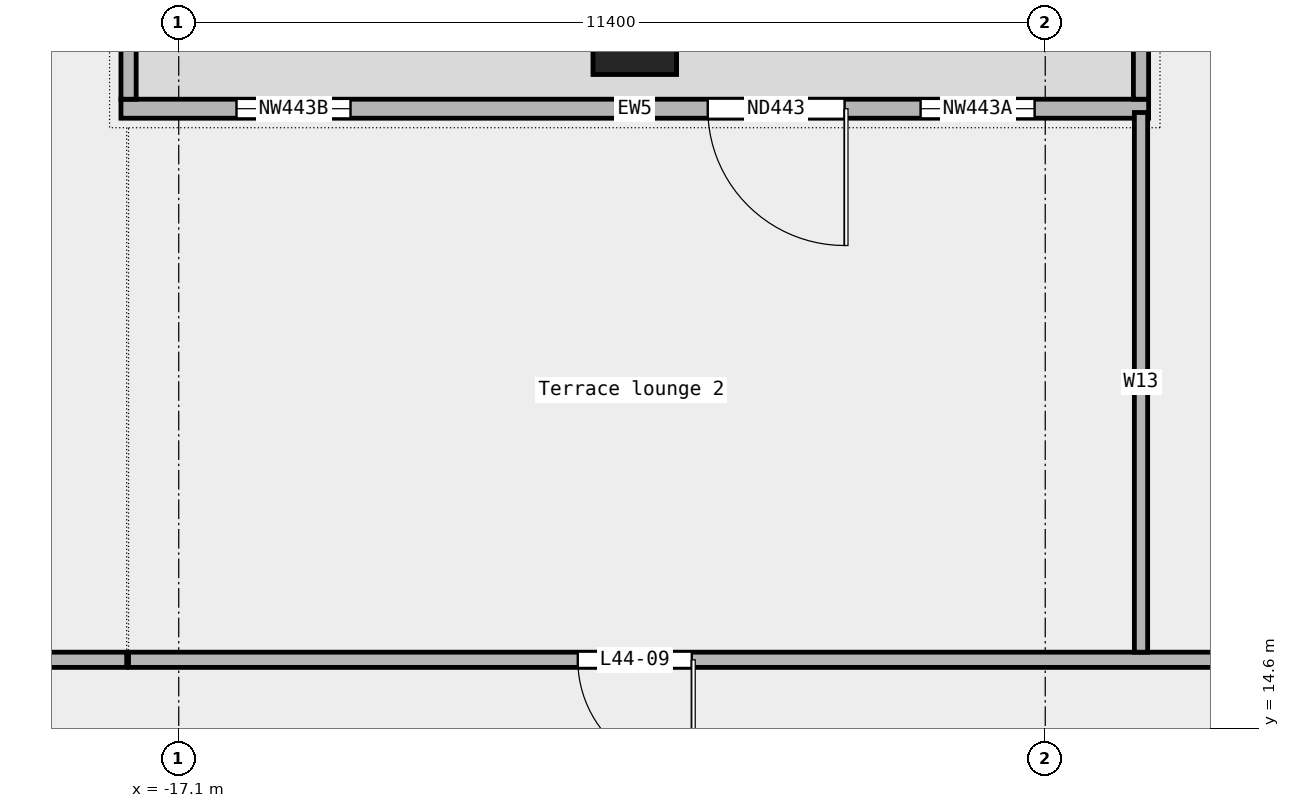
"""IFC4 building model, lengths in metres.
Left out: names, types, materials, properties, quantities, classifications, styles, units other than length and angle.
Written with IfcOpenShell. Run it as: python <this file> out.ifc"""

import sys

from ifc_helpers import new_model, si_unit, direction, frame, frame_2d, origin, origin_2d, place, context, subcontext, project, spatial, rectangle, extrude, element, fill, save


model = new_model("IFC4")
c1 = context("Model", 3, precision=1e-05, world=origin(), true_north=direction((0.0, 1.0)))
c2 = subcontext(c1, "Body", "Model", "MODEL_VIEW")
j1 = project(units=[si_unit("LENGTHUNIT", "METRE"), si_unit("PLANEANGLEUNIT", "RADIAN")], contexts=[c1])
p1 = place(None, origin())
s1 = spatial("IfcSite", under=j1, at=p1, CompositionType="ELEMENT")
p2 = place(p1, origin())
s2 = spatial("IfcBuilding", under=s1, at=p2, CompositionType="ELEMENT")
p3 = place(p2, frame((0.0, 0.0, 211.0)))
s3 = spatial("IfcBuildingStorey", under=s2, at=p3, CompositionType="ELEMENT", Elevation=211.0)
p4 = place(p3, frame((-11.1, 23.75, 0.0), z_axis=(0.0, 0.0, 1.0), x_axis=(1.0, 0.0, 0.0)))
e1 = element("IfcColumn", 1, at=p4, inside=s3, PredefinedType="COLUMN", context=c2, shape_type="SweptSolid", body=[
    extrude(rectangle(XDim=1.1, YDim=1.1, at=origin_2d()), origin(), (0.0, 0.0, 1.0), 3.6),
])
p5 = place(p3, frame((-4.34, 22.75, 0.0), z_axis=(0.0, 0.0, 1.0), x_axis=(-1.0, 0.0, 0.0)))
e2 = element("IfcWall", 2, at=p5, inside=s3, PredefinedType="STANDARD", context=c2, shape_type="SweptSolid", body=[
    extrude(rectangle(XDim=13.52, YDim=0.25, at=frame_2d((6.76, 0.0))), origin(), (0.0, 0.0, 1.0), 3.6),
])
p6 = place(p5, frame((1.5, 0.0, 0.45)))
e3 = element("IfcOpeningElement", 3, at=p6, cuts=e2, PredefinedType="OPENING", context=c2, shape_type="SweptSolid", body=[
    extrude(rectangle(XDim=1.5, YDim=2.4, at=frame_2d((0.75, 1.2))), frame((0.0, 0.137, 0.0), z_axis=(0.0, -1.0, 0.0), x_axis=(1.0, 0.0, 0.0)), (0.0, 0.0, 1.0), 0.274),
])
p7 = place(p5, frame((4.0, 0.0, 0.0)))
e4 = element("IfcOpeningElement", 4, at=p7, cuts=e2, PredefinedType="OPENING", context=c2, shape_type="SweptSolid", body=[
    extrude(rectangle(XDim=1.8, YDim=2.4, at=frame_2d((0.9, 1.2))), frame((0.0, 0.137, 0.0), z_axis=(0.0, -1.0, 0.0), x_axis=(1.0, 0.0, 0.0)), (0.0, 0.0, 1.0), 0.274),
])
p8 = place(p5, frame((10.5, 0.0, 0.45)))
e5 = element("IfcOpeningElement", 5, at=p8, cuts=e2, PredefinedType="OPENING", context=c2, shape_type="SweptSolid", body=[
    extrude(rectangle(XDim=1.5, YDim=2.4, at=frame_2d((0.75, 1.2))), frame((0.0, 0.137, 0.0), z_axis=(0.0, -1.0, 0.0), x_axis=(1.0, 0.0, 0.0)), (0.0, 0.0, 1.0), 0.274),
])
for number, where, z_axis, x_axis in (
    (6, (-4.44, 24.75, 0.0), (0.0, 0.0, 1.0), (0.0, -1.0, 0.0)),
    (7, (-17.76, 24.75, 0.0), (0.0, 0.0, 1.0), (0.0, -1.0, 0.0)),
):
    element("IfcWall", number, at=place(p3, frame(where, z_axis=z_axis, x_axis=x_axis)), inside=s3, PredefinedType="STANDARD", context=c2, shape_type="SweptSolid", body=[
        extrude(rectangle(XDim=1.875, YDim=0.2, at=frame_2d((0.938, 0.0))), origin(), (0.0, 0.0, 1.0), 3.6),
    ])
p9 = place(p3, frame((-28.15, 15.5, 0.0), z_axis=(0.0, 0.0, 1.0), x_axis=(1.0, 0.0, 0.0)))
e8 = element("IfcWall", 8, at=p9, inside=s3, PredefinedType="PARTITIONING", context=c2, shape_type="SweptSolid", body=[
    extrude(rectangle(XDim=10.365, YDim=0.2, at=frame_2d((5.183, 0.0))), origin(), (0.0, 0.0, 1.0), 3.6),
])
p10 = place(p9, frame((4.683, 0.0, 0.0)))
e9 = element("IfcOpeningElement", 9, at=p10, cuts=e8, PredefinedType="OPENING", context=c2, shape_type="SweptSolid", body=[
    extrude(rectangle(XDim=1.2, YDim=2.1, at=frame_2d((0.6, 1.05))), frame((0.0, 0.112, 0.0), z_axis=(0.0, -1.0, 0.0), x_axis=(1.0, 0.0, 0.0)), (0.0, 0.0, 1.0), 0.224),
])
p11 = place(p3, frame((-17.76, 15.5, 0.0), z_axis=(0.0, 0.0, 1.0), x_axis=(1.0, 0.0, 0.0)))
e10 = element("IfcWall", 10, at=p11, inside=s3, PredefinedType="PARTITIONING", context=c2, shape_type="SweptSolid", body=[
    extrude(rectangle(XDim=45.91, YDim=0.2, at=frame_2d((22.955, 0.0))), origin(), (0.0, 0.0, 1.0), 3.6),
])
p12 = place(p11, frame((37.337, 0.0, 0.0)))
e11 = element("IfcOpeningElement", 11, at=p12, cuts=e10, PredefinedType="OPENING", context=c2, shape_type="SweptSolid", body=[
    extrude(rectangle(XDim=1.5, YDim=2.1, at=frame_2d((0.75, 1.05))), frame((0.0, 0.112, 0.0), z_axis=(0.0, -1.0, 0.0), x_axis=(1.0, 0.0, 0.0)), (0.0, 0.0, 1.0), 0.224),
])
p13 = place(p11, frame((24.633, 0.0, 0.0)))
e12 = element("IfcOpeningElement", 12, at=p13, cuts=e10, PredefinedType="OPENING", context=c2, shape_type="SweptSolid", body=[
    extrude(rectangle(XDim=1.5, YDim=2.1, at=frame_2d((0.75, 1.05))), frame((0.0, 0.112, 0.0), z_axis=(0.0, -1.0, 0.0), x_axis=(1.0, 0.0, 0.0)), (0.0, 0.0, 1.0), 0.224),
])
p14 = place(p11, frame((5.91, 0.0, 0.0)))
e13 = element("IfcOpeningElement", 13, at=p14, cuts=e10, PredefinedType="OPENING", context=c2, shape_type="SweptSolid", body=[
    extrude(rectangle(XDim=1.5, YDim=2.1, at=frame_2d((0.75, 1.05))), frame((0.0, 0.112, 0.0), z_axis=(0.0, -1.0, 0.0), x_axis=(1.0, 0.0, 0.0)), (0.0, 0.0, 1.0), 0.224),
])
p15 = place(p11, frame((16.21, 0.0, 0.0)))
e14 = element("IfcOpeningElement", 14, at=p15, cuts=e10, PredefinedType="OPENING", context=c2, shape_type="SweptSolid", body=[
    extrude(rectangle(XDim=1.2, YDim=2.1, at=frame_2d((0.6, 1.05))), frame((0.0, 0.112, 0.0), z_axis=(0.0, -1.0, 0.0), x_axis=(1.0, 0.0, 0.0)), (0.0, 0.0, 1.0), 0.224),
])
p16 = place(p3, frame((-4.44, 15.6, 0.0), z_axis=(0.0, 0.0, 1.0), x_axis=(0.0, 1.0, 0.0)))
e15 = element("IfcWall", 15, at=p16, inside=s3, PredefinedType="PARTITIONING", context=c2, shape_type="SweptSolid", body=[
    extrude(rectangle(XDim=7.1, YDim=0.175, at=frame_2d((3.55, 0.0))), origin(), (0.0, 0.0, 1.0), 3.6),
])
p17 = place(p6, origin())
e16 = element("IfcWindow", 16, at=p17, inside=s3, PartitioningType="SINGLE_PANEL", PredefinedType="WINDOW", context=c2, shape_type="SweptSolid", body=[
    extrude(rectangle(XDim=1.5, YDim=2.4, at=frame_2d((0.75, 1.2))), frame((0.0, 0.03, 0.0), z_axis=(0.0, -1.0, 0.0), x_axis=(1.0, 0.0, 0.0)), (0.0, 0.0, 1.0), 0.06),
])
fill(e3, e16)
p18 = place(p7, origin())
e17 = element("IfcDoor", 17, at=p18, inside=s3, OperationType="DOUBLE_DOOR_SINGLE_SWING", PredefinedType="DOOR", context=c2, shape_type="SweptSolid", body=[
    extrude(rectangle(XDim=1.8, YDim=2.4, at=frame_2d((0.9, 1.2))), frame((0.0, 0.025, 0.0), z_axis=(0.0, -1.0, 0.0), x_axis=(1.0, 0.0, 0.0)), (0.0, 0.0, 1.0), 0.05),
])
fill(e4, e17)
p19 = place(p8, origin())
e18 = element("IfcWindow", 18, at=p19, inside=s3, PartitioningType="SINGLE_PANEL", PredefinedType="WINDOW", context=c2, shape_type="SweptSolid", body=[
    extrude(rectangle(XDim=1.5, YDim=2.4, at=frame_2d((0.75, 1.2))), frame((0.0, 0.03, 0.0), z_axis=(0.0, -1.0, 0.0), x_axis=(1.0, 0.0, 0.0)), (0.0, 0.0, 1.0), 0.06),
])
fill(e5, e18)
p20 = place(p14, origin())
e19 = element("IfcDoor", 19, at=p20, inside=s3, OperationType="DOUBLE_DOOR_SINGLE_SWING", PredefinedType="DOOR", context=c2, shape_type="SweptSolid", body=[
    extrude(rectangle(XDim=1.5, YDim=2.1, at=frame_2d((0.75, 1.05))), frame((0.0, 0.025, 0.0), z_axis=(0.0, -1.0, 0.0), x_axis=(1.0, 0.0, 0.0)), (0.0, 0.0, 1.0), 0.05),
])
fill(e13, e19)
save(model, sys.argv[1])
